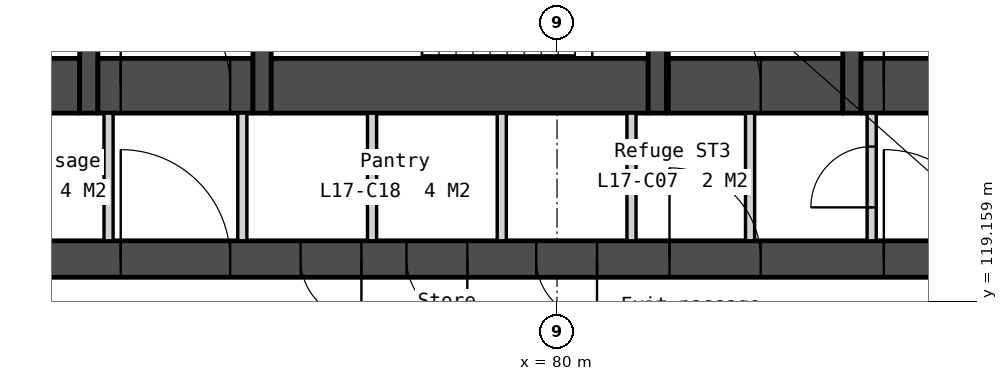
"""IFC4 building model, lengths in metres.
Left out: names, types, materials, properties, quantities, classifications, styles, units other than length and angle.
Written with IfcOpenShell. Run it as: python <this file> out.ifc"""

import sys

from ifc_helpers import new_model, si_unit, direction, frame, frame_2d, origin, place, context, subcontext, project, spatial, polyline, rectangle, outline, extrude, element, fill, save


model = new_model("IFC4")
c1 = context("Model", 3, precision=1e-05, world=origin(), true_north=direction((0.0, 1.0)))
c2 = subcontext(c1, "Body", "Model", "MODEL_VIEW")
j1 = project(units=[si_unit("LENGTHUNIT", "METRE"), si_unit("PLANEANGLEUNIT", "RADIAN")], contexts=[c1])
p1 = place(None, origin())
s1 = spatial("IfcSite", under=j1, at=p1, CompositionType="ELEMENT")
p2 = place(p1, origin())
s2 = spatial("IfcBuilding", under=s1, at=p2, CompositionType="ELEMENT")
p3 = place(p2, frame((0.0, 0.0, 73.5)))
s3 = spatial("IfcBuildingStorey", under=s2, at=p3, CompositionType="ELEMENT", Elevation=73.5)
p4 = place(p3, frame((66.0, 119.85, 0.0), z_axis=(0.0, 0.0, 1.0), x_axis=(1.0, 0.0, 0.0)))
e1 = element("IfcWall", 1, at=p4, inside=s3, PredefinedType="SOLIDWALL", context=c2, shape_type="SweptSolid", body=[
    extrude(rectangle(XDim=28.0, YDim=0.6, at=frame_2d((14.0, 0.0))), origin(), (0.0, 0.0, 1.0), 3.25),
])
p5 = place(p4, frame((6.825, 0.0, 0.0)))
e2 = element("IfcOpeningElement", 2, at=p5, cuts=e1, PredefinedType="OPENING", context=c2, shape_type="SweptSolid", body=[
    extrude(rectangle(XDim=1.8, YDim=2.1, at=frame_2d((0.9, 1.05))), frame((0.0, 0.31, 0.0), z_axis=(0.0, -1.0, 0.0), x_axis=(1.0, 0.0, 0.0)), (0.0, 0.0, 1.0), 0.62),
])
p6 = place(p4, frame((15.85, 0.0, 0.0)))
e3 = element("IfcOpeningElement", 3, at=p6, cuts=e1, PredefinedType="OPENING", context=c2, shape_type="SweptSolid", body=[
    extrude(rectangle(XDim=1.5, YDim=2.1, at=frame_2d((0.75, 1.05))), frame((0.0, 0.31, 0.0), z_axis=(0.0, -1.0, 0.0), x_axis=(1.0, 0.0, 0.0)), (0.0, 0.0, 1.0), 0.62),
])
p7 = place(p4, frame((19.375, 0.0, 0.0)))
e4 = element("IfcOpeningElement", 4, at=p7, cuts=e1, PredefinedType="OPENING", context=c2, shape_type="SweptSolid", body=[
    extrude(rectangle(XDim=1.8, YDim=2.1, at=frame_2d((0.9, 1.05))), frame((0.0, 0.31, 0.0), z_axis=(0.0, -1.0, 0.0), x_axis=(1.0, 0.0, 0.0)), (0.0, 0.0, 1.0), 0.62),
])
p8 = place(p4, frame((4.425, 0.0, 0.0)))
e5 = element("IfcOpeningElement", 5, at=p8, cuts=e1, PredefinedType="OPENING", context=c2, shape_type="SweptSolid", body=[
    extrude(rectangle(XDim=1.0, YDim=2.1, at=frame_2d((0.5, 1.05))), frame((0.0, 0.31, 0.0), z_axis=(0.0, -1.0, 0.0), x_axis=(1.0, 0.0, 0.0)), (0.0, 0.0, 1.0), 0.62),
])
p9 = place(p4, frame((9.783, 0.0, 0.0)))
e6 = element("IfcOpeningElement", 6, at=p9, cuts=e1, PredefinedType="OPENING", context=c2, shape_type="SweptSolid", body=[
    extrude(rectangle(XDim=1.0, YDim=2.1, at=frame_2d((0.5, 1.05))), frame((0.0, 0.31, 0.0), z_axis=(0.0, -1.0, 0.0), x_axis=(1.0, 0.0, 0.0)), (0.0, 0.0, 1.0), 0.62),
])
p10 = place(p4, frame((11.525, 0.0, 0.0)))
e7 = element("IfcOpeningElement", 7, at=p10, cuts=e1, PredefinedType="OPENING", context=c2, shape_type="SweptSolid", body=[
    extrude(rectangle(XDim=1.0, YDim=2.1, at=frame_2d((0.5, 1.05))), frame((0.0, 0.31, 0.0), z_axis=(0.0, -1.0, 0.0), x_axis=(1.0, 0.0, 0.0)), (0.0, 0.0, 1.0), 0.62),
])
p11 = place(p4, frame((13.658, 0.0, 0.0)))
e8 = element("IfcOpeningElement", 8, at=p11, cuts=e1, PredefinedType="OPENING", context=c2, shape_type="SweptSolid", body=[
    extrude(rectangle(XDim=1.0, YDim=2.1, at=frame_2d((0.5, 1.05))), frame((0.0, 0.31, 0.0), z_axis=(0.0, -1.0, 0.0), x_axis=(1.0, 0.0, 0.0)), (0.0, 0.0, 1.0), 0.62),
])
p12 = place(p4, frame((22.575, 0.0, 0.0)))
e9 = element("IfcOpeningElement", 9, at=p12, cuts=e1, PredefinedType="OPENING", context=c2, shape_type="SweptSolid", body=[
    extrude(rectangle(XDim=1.0, YDim=2.1, at=frame_2d((0.5, 1.05))), frame((0.0, 0.31, 0.0), z_axis=(0.0, -1.0, 0.0), x_axis=(1.0, 0.0, 0.0)), (0.0, 0.0, 1.0), 0.62),
])
p13 = place(p3, frame((69.6, 122.7, 0.0), z_axis=(0.0, 0.0, 1.0), x_axis=(1.0, 0.0, 0.0)))
e10 = element("IfcWall", 10, at=p13, inside=s3, PredefinedType="SOLIDWALL", context=c2, shape_type="SweptSolid", body=[
    extrude(rectangle(XDim=2.55, YDim=0.9, at=frame_2d((1.275, 0.0))), origin(), (0.0, 0.0, 1.0), 3.25),
])
p14 = place(p3, frame((72.3, 133.95, 0.0), z_axis=(0.0, 0.0, 1.0), x_axis=(0.0, -1.0, 0.0)))
e11 = element("IfcWall", 11, at=p14, inside=s3, PredefinedType="SOLIDWALL", context=c2, shape_type="SweptSolid", body=[
    extrude(rectangle(XDim=11.7, YDim=0.3, at=frame_2d((5.85, 0.0))), origin(), (0.0, 0.0, 1.0), 3.25),
])
p15 = place(p14, frame((6.95, 0.0, 0.0)))
e12 = element("IfcOpeningElement", 12, at=p15, cuts=e11, PredefinedType="OPENING", context=c2, shape_type="SweptSolid", body=[
    extrude(rectangle(XDim=1.1, YDim=2.1, at=frame_2d((0.55, 1.05))), frame((0.0, 0.16, 0.0), z_axis=(0.0, -1.0, 0.0), x_axis=(1.0, 0.0, 0.0)), (0.0, 0.0, 1.0), 0.32),
])
p16 = place(p14, frame((9.35, 0.0, 0.0)))
e13 = element("IfcOpeningElement", 13, at=p16, cuts=e11, PredefinedType="OPENING", context=c2, shape_type="SweptSolid", body=[
    extrude(rectangle(XDim=0.9, YDim=2.1, at=frame_2d((0.45, 1.05))), frame((0.0, 0.16, 0.0), z_axis=(0.0, -1.0, 0.0), x_axis=(1.0, 0.0, 0.0)), (0.0, 0.0, 1.0), 0.32),
])
p17 = place(p14, frame((5.1, 0.0, 0.0)))
e14 = element("IfcOpeningElement", 14, at=p17, cuts=e11, PredefinedType="OPENING", context=c2, shape_type="SweptSolid", body=[
    extrude(rectangle(XDim=1.0, YDim=2.1, at=frame_2d((0.5, 1.05))), frame((0.0, 0.16, 0.0), z_axis=(0.0, -1.0, 0.0), x_axis=(1.0, 0.0, 0.0)), (0.0, 0.0, 1.0), 0.32),
])
p18 = place(p3, frame((72.45, 122.7, 0.0), z_axis=(0.0, 0.0, 1.0), x_axis=(1.0, 0.0, 0.0)))
e15 = element("IfcWall", 15, at=p18, inside=s3, PredefinedType="SOLIDWALL", context=c2, shape_type="SweptSolid", body=[
    extrude(rectangle(XDim=2.55, YDim=0.9, at=frame_2d((1.275, 0.0))), origin(), (0.0, 0.0, 1.0), 3.25),
])
p19 = place(p18, frame((0.375, 0.0, 0.0)))
e16 = element("IfcOpeningElement", 16, at=p19, cuts=e15, PredefinedType="OPENING", context=c2, shape_type="SweptSolid", body=[
    extrude(rectangle(XDim=1.8, YDim=2.1, at=frame_2d((0.9, 1.05))), frame((0.0, 0.46, 0.0), z_axis=(0.0, -1.0, 0.0), x_axis=(1.0, 0.0, 0.0)), (0.0, 0.0, 1.0), 0.92),
])
for number, where, z_axis, x_axis in (
    (17, (72.625, 122.25, 0.0), (0.0, 0.0, 1.0), (0.0, -1.0, 0.0)),
    (18, (74.825, 122.25, 0.0), (0.0, 0.0, 1.0), (0.0, -1.0, 0.0)),
):
    element("IfcWall", number, at=place(p3, frame(where, z_axis=z_axis, x_axis=x_axis)), inside=s3, PredefinedType="PARTITIONING", context=c2, shape_type="SweptSolid", body=[
        extrude(rectangle(XDim=2.1, YDim=0.15, at=frame_2d((1.05, 0.0))), origin(), (0.0, 0.0, 1.0), 3.25),
    ])
p20 = place(p3, frame((75.15, 133.95, 0.0), z_axis=(0.0, 0.0, 1.0), x_axis=(0.0, -1.0, 0.0)))
e19 = element("IfcWall", 19, at=p20, inside=s3, PredefinedType="SOLIDWALL", context=c2, shape_type="SweptSolid", body=[
    extrude(rectangle(XDim=11.7, YDim=0.3, at=frame_2d((5.85, 0.0))), origin(), (0.0, 0.0, 1.0), 3.25),
])
p21 = place(p3, frame((75.3, 122.7, 0.0), z_axis=(0.0, 0.0, 1.0), x_axis=(1.0, 0.0, 0.0)))
e20 = element("IfcWall", 20, at=p21, inside=s3, PredefinedType="SOLIDWALL", context=c2, shape_type="SweptSolid", body=[
    extrude(rectangle(XDim=6.2, YDim=0.9, at=frame_2d((3.1, 0.0))), origin(), (0.0, 0.0, 1.0), 3.25),
])
for number, where, z_axis, x_axis in (
    (21, (76.958, 122.25, 0.0), (0.0, 0.0, 1.0), (0.0, -1.0, 0.0)),
    (22, (79.092, 122.25, 0.0), (0.0, 0.0, 1.0), (0.0, -1.0, 0.0)),
    (23, (81.225, 122.25, 0.0), (0.0, 0.0, 1.0), (0.0, -1.0, 0.0)),
):
    element("IfcWall", number, at=place(p3, frame(where, z_axis=z_axis, x_axis=x_axis)), inside=s3, PredefinedType="PARTITIONING", context=c2, shape_type="SweptSolid", body=[
        extrude(rectangle(XDim=2.1, YDim=0.15, at=frame_2d((1.05, 0.0))), origin(), (0.0, 0.0, 1.0), 3.25),
    ])
p22 = place(p3, frame((81.65, 125.7, 0.0), z_axis=(0.0, 0.0, 1.0), x_axis=(0.0, -1.0, 0.0)))
e24 = element("IfcWall", 24, at=p22, inside=s3, PredefinedType="SOLIDWALL", context=c2, shape_type="SweptSolid", body=[
    extrude(rectangle(XDim=3.45, YDim=0.3, at=frame_2d((1.725, 0.0))), origin(), (0.0, 0.0, 1.0), 3.25),
])
p23 = place(p22, frame((0.75, 0.0, 0.0)))
e25 = element("IfcOpeningElement", 25, at=p23, cuts=e24, PredefinedType="OPENING", context=c2, shape_type="SweptSolid", body=[
    extrude(rectangle(XDim=1.0, YDim=2.1, at=frame_2d((0.5, 1.05))), frame((0.0, 0.16, 0.0), z_axis=(0.0, -1.0, 0.0), x_axis=(1.0, 0.0, 0.0)), (0.0, 0.0, 1.0), 0.32),
])
p24 = place(p3, frame((81.8, 122.7, 0.0), z_axis=(0.0, 0.0, 1.0), x_axis=(1.0, 0.0, 0.0)))
e26 = element("IfcWall", 26, at=p24, inside=s3, PredefinedType="SOLIDWALL", context=c2, shape_type="SweptSolid", body=[
    extrude(rectangle(XDim=2.9, YDim=0.9, at=frame_2d((1.45, 0.0))), origin(), (0.0, 0.0, 1.0), 3.25),
])
p25 = place(p24, frame((0.05, 0.0, 0.0)))
e27 = element("IfcOpeningElement", 27, at=p25, cuts=e26, PredefinedType="OPENING", context=c2, shape_type="SweptSolid", body=[
    extrude(rectangle(XDim=1.5, YDim=2.1, at=frame_2d((0.75, 1.05))), frame((0.0, 0.46, 0.0), z_axis=(0.0, -1.0, 0.0), x_axis=(1.0, 0.0, 0.0)), (0.0, 0.0, 1.0), 0.92),
])
p26 = place(p3, frame((83.175, 122.25, 0.0), z_axis=(0.0, 0.0, 1.0), x_axis=(0.0, -1.0, 0.0)))
e28 = element("IfcWall", 28, at=p26, inside=s3, PredefinedType="PARTITIONING", context=c2, shape_type="SweptSolid", body=[
    extrude(rectangle(XDim=2.1, YDim=0.15, at=frame_2d((1.05, 0.0))), origin(), (0.0, 0.0, 1.0), 3.25),
])
p27 = place(p3, frame((84.85, 133.95, 0.0), z_axis=(0.0, 0.0, 1.0), x_axis=(0.0, -1.0, 0.0)))
e29 = element("IfcWall", 29, at=p27, inside=s3, PredefinedType="SOLIDWALL", context=c2, shape_type="SweptSolid", body=[
    extrude(rectangle(XDim=11.7, YDim=0.3, at=frame_2d((5.85, 0.0))), origin(), (0.0, 0.0, 1.0), 3.25),
])
p28 = place(p3, frame((85.0, 122.7, 0.0), z_axis=(0.0, 0.0, 1.0), x_axis=(1.0, 0.0, 0.0)))
e30 = element("IfcWall", 30, at=p28, inside=s3, PredefinedType="SOLIDWALL", context=c2, shape_type="SweptSolid", body=[
    extrude(rectangle(XDim=2.55, YDim=0.9, at=frame_2d((1.275, 0.0))), origin(), (0.0, 0.0, 1.0), 3.25),
])
p29 = place(p28, frame((0.375, 0.0, 0.0)))
e31 = element("IfcOpeningElement", 31, at=p29, cuts=e30, PredefinedType="OPENING", context=c2, shape_type="SweptSolid", body=[
    extrude(rectangle(XDim=1.8, YDim=2.1, at=frame_2d((0.9, 1.05))), frame((0.0, 0.46, 0.0), z_axis=(0.0, -1.0, 0.0), x_axis=(1.0, 0.0, 0.0)), (0.0, 0.0, 1.0), 0.92),
])
p30 = place(p3, frame((85.175, 122.25, 0.0), z_axis=(0.0, 0.0, 1.0), x_axis=(0.0, -1.0, 0.0)))
e32 = element("IfcWall", 32, at=p30, inside=s3, PredefinedType="PARTITIONING", context=c2, shape_type="SweptSolid", body=[
    extrude(rectangle(XDim=2.1, YDim=0.15, at=frame_2d((1.05, 0.0))), origin(), (0.0, 0.0, 1.0), 3.25),
])
p31 = place(p30, frame((0.55, 0.0, 0.0)))
e33 = element("IfcOpeningElement", 33, at=p31, cuts=e32, PredefinedType="OPENING", context=c2, shape_type="SweptSolid", body=[
    extrude(rectangle(XDim=1.0, YDim=2.1, at=frame_2d((0.5, 1.05))), frame((0.0, 0.085, 0.0), z_axis=(0.0, -1.0, 0.0), x_axis=(1.0, 0.0, 0.0)), (0.0, 0.0, 1.0), 0.17),
])
p32 = place(p3, frame((54.495, 129.397, -0.15), z_axis=(0.0, 0.0, 1.0), x_axis=(0.499999201451, -0.866025864826, 0.0)))
e34 = element("IfcWall", 34, at=p32, inside=s3, PredefinedType="SOLIDWALL", context=c2, shape_type="SweptSolid", body=[
    extrude(outline(polyline([(44.8, 0.0), (44.8, 3.4), (0.0, 3.4), (0.0, 0.0), (44.8, 0.0)])), frame((0.0, 0.225, 0.0), z_axis=(0.0, -1.0, 0.0), x_axis=(1.0, 0.0, 0.0)), (0.0, 0.0, 1.0), 0.45),
])
p33 = place(p32, frame((3.03, 0.0, 1.05)))
e35 = element("IfcOpeningElement", 35, at=p33, cuts=e34, PredefinedType="OPENING", context=c2, shape_type="SweptSolid", body=[
    extrude(rectangle(XDim=1.2, YDim=1.5, at=frame_2d((0.6, 0.75))), frame((0.0, 0.235, 0.0), z_axis=(0.0, -1.0, 0.0), x_axis=(1.0, 0.0, 0.0)), (0.0, 0.0, 1.0), 0.47),
])
p34 = place(p32, frame((4.73, 0.0, 1.05)))
e36 = element("IfcOpeningElement", 36, at=p34, cuts=e34, PredefinedType="OPENING", context=c2, shape_type="SweptSolid", body=[
    extrude(rectangle(XDim=1.2, YDim=1.5, at=frame_2d((0.6, 0.75))), frame((0.0, 0.235, 0.0), z_axis=(0.0, -1.0, 0.0), x_axis=(1.0, 0.0, 0.0)), (0.0, 0.0, 1.0), 0.47),
])
p35 = place(p32, frame((11.99, 0.0, 1.05)))
e37 = element("IfcOpeningElement", 37, at=p35, cuts=e34, PredefinedType="OPENING", context=c2, shape_type="SweptSolid", body=[
    extrude(rectangle(XDim=1.2, YDim=1.5, at=frame_2d((0.6, 0.75))), frame((0.0, 0.235, 0.0), z_axis=(0.0, -1.0, 0.0), x_axis=(1.0, 0.0, 0.0)), (0.0, 0.0, 1.0), 0.47),
])
p36 = place(p32, frame((13.69, 0.0, 1.05)))
e38 = element("IfcOpeningElement", 38, at=p36, cuts=e34, PredefinedType="OPENING", context=c2, shape_type="SweptSolid", body=[
    extrude(rectangle(XDim=1.2, YDim=1.5, at=frame_2d((0.6, 0.75))), frame((0.0, 0.235, 0.0), z_axis=(0.0, -1.0, 0.0), x_axis=(1.0, 0.0, 0.0)), (0.0, 0.0, 1.0), 0.47),
])
p37 = place(p32, frame((20.95, 0.0, 1.05)))
e39 = element("IfcOpeningElement", 39, at=p37, cuts=e34, PredefinedType="OPENING", context=c2, shape_type="SweptSolid", body=[
    extrude(rectangle(XDim=1.2, YDim=1.5, at=frame_2d((0.6, 0.75))), frame((0.0, 0.235, 0.0), z_axis=(0.0, -1.0, 0.0), x_axis=(1.0, 0.0, 0.0)), (0.0, 0.0, 1.0), 0.47),
])
p38 = place(p32, frame((22.65, 0.0, 1.05)))
e40 = element("IfcOpeningElement", 40, at=p38, cuts=e34, PredefinedType="OPENING", context=c2, shape_type="SweptSolid", body=[
    extrude(rectangle(XDim=1.2, YDim=1.5, at=frame_2d((0.6, 0.75))), frame((0.0, 0.235, 0.0), z_axis=(0.0, -1.0, 0.0), x_axis=(1.0, 0.0, 0.0)), (0.0, 0.0, 1.0), 0.47),
])
p39 = place(p32, frame((29.91, 0.0, 1.05)))
e41 = element("IfcOpeningElement", 41, at=p39, cuts=e34, PredefinedType="OPENING", context=c2, shape_type="SweptSolid", body=[
    extrude(rectangle(XDim=1.2, YDim=1.5, at=frame_2d((0.6, 0.75))), frame((0.0, 0.235, 0.0), z_axis=(0.0, -1.0, 0.0), x_axis=(1.0, 0.0, 0.0)), (0.0, 0.0, 1.0), 0.47),
])
p40 = place(p32, frame((31.61, 0.0, 1.05)))
e42 = element("IfcOpeningElement", 42, at=p40, cuts=e34, PredefinedType="OPENING", context=c2, shape_type="SweptSolid", body=[
    extrude(rectangle(XDim=1.2, YDim=1.5, at=frame_2d((0.6, 0.75))), frame((0.0, 0.235, 0.0), z_axis=(0.0, -1.0, 0.0), x_axis=(1.0, 0.0, 0.0)), (0.0, 0.0, 1.0), 0.47),
])
p41 = place(p32, frame((38.87, 0.0, 1.05)))
e43 = element("IfcOpeningElement", 43, at=p41, cuts=e34, PredefinedType="OPENING", context=c2, shape_type="SweptSolid", body=[
    extrude(rectangle(XDim=1.2, YDim=1.5, at=frame_2d((0.6, 0.75))), frame((0.0, 0.235, 0.0), z_axis=(0.0, -1.0, 0.0), x_axis=(1.0, 0.0, 0.0)), (0.0, 0.0, 1.0), 0.47),
])
p42 = place(p32, frame((40.57, 0.0, 1.05)))
e44 = element("IfcOpeningElement", 44, at=p42, cuts=e34, PredefinedType="OPENING", context=c2, shape_type="SweptSolid", body=[
    extrude(rectangle(XDim=1.2, YDim=1.5, at=frame_2d((0.6, 0.75))), frame((0.0, 0.235, 0.0), z_axis=(0.0, -1.0, 0.0), x_axis=(1.0, 0.0, 0.0)), (0.0, 0.0, 1.0), 0.47),
])
p43 = place(p3, frame((83.105, 90.599, -0.15), z_axis=(0.0, 0.0, 1.0), x_axis=(0.499999201451, 0.866025864826, 0.0)))
e45 = element("IfcWall", 45, at=p43, inside=s3, PredefinedType="SOLIDWALL", context=c2, shape_type="SweptSolid", body=[
    extrude(outline(polyline([(44.8, 0.0), (44.8, 3.4), (0.0, 3.4), (0.0, 0.0), (44.8, 0.0)])), frame((0.0, 0.225, 0.0), z_axis=(0.0, -1.0, 0.0), x_axis=(1.0, 0.0, 0.0)), (0.0, 0.0, 1.0), 0.45),
])
p44 = place(p43, frame((3.03, 0.0, 1.05)))
e46 = element("IfcOpeningElement", 46, at=p44, cuts=e45, PredefinedType="OPENING", context=c2, shape_type="SweptSolid", body=[
    extrude(rectangle(XDim=1.2, YDim=1.5, at=frame_2d((0.6, 0.75))), frame((0.0, 0.235, 0.0), z_axis=(0.0, -1.0, 0.0), x_axis=(1.0, 0.0, 0.0)), (0.0, 0.0, 1.0), 0.47),
])
p45 = place(p43, frame((4.73, 0.0, 1.05)))
e47 = element("IfcOpeningElement", 47, at=p45, cuts=e45, PredefinedType="OPENING", context=c2, shape_type="SweptSolid", body=[
    extrude(rectangle(XDim=1.2, YDim=1.5, at=frame_2d((0.6, 0.75))), frame((0.0, 0.235, 0.0), z_axis=(0.0, -1.0, 0.0), x_axis=(1.0, 0.0, 0.0)), (0.0, 0.0, 1.0), 0.47),
])
p46 = place(p43, frame((11.99, 0.0, 1.05)))
e48 = element("IfcOpeningElement", 48, at=p46, cuts=e45, PredefinedType="OPENING", context=c2, shape_type="SweptSolid", body=[
    extrude(rectangle(XDim=1.2, YDim=1.5, at=frame_2d((0.6, 0.75))), frame((0.0, 0.235, 0.0), z_axis=(0.0, -1.0, 0.0), x_axis=(1.0, 0.0, 0.0)), (0.0, 0.0, 1.0), 0.47),
])
p47 = place(p43, frame((13.69, 0.0, 1.05)))
e49 = element("IfcOpeningElement", 49, at=p47, cuts=e45, PredefinedType="OPENING", context=c2, shape_type="SweptSolid", body=[
    extrude(rectangle(XDim=1.2, YDim=1.5, at=frame_2d((0.6, 0.75))), frame((0.0, 0.235, 0.0), z_axis=(0.0, -1.0, 0.0), x_axis=(1.0, 0.0, 0.0)), (0.0, 0.0, 1.0), 0.47),
])
p48 = place(p43, frame((20.95, 0.0, 1.05)))
e50 = element("IfcOpeningElement", 50, at=p48, cuts=e45, PredefinedType="OPENING", context=c2, shape_type="SweptSolid", body=[
    extrude(rectangle(XDim=1.2, YDim=1.5, at=frame_2d((0.6, 0.75))), frame((0.0, 0.235, 0.0), z_axis=(0.0, -1.0, 0.0), x_axis=(1.0, 0.0, 0.0)), (0.0, 0.0, 1.0), 0.47),
])
p49 = place(p43, frame((22.65, 0.0, 1.05)))
e51 = element("IfcOpeningElement", 51, at=p49, cuts=e45, PredefinedType="OPENING", context=c2, shape_type="SweptSolid", body=[
    extrude(rectangle(XDim=1.2, YDim=1.5, at=frame_2d((0.6, 0.75))), frame((0.0, 0.235, 0.0), z_axis=(0.0, -1.0, 0.0), x_axis=(1.0, 0.0, 0.0)), (0.0, 0.0, 1.0), 0.47),
])
p50 = place(p43, frame((29.91, 0.0, 1.05)))
e52 = element("IfcOpeningElement", 52, at=p50, cuts=e45, PredefinedType="OPENING", context=c2, shape_type="SweptSolid", body=[
    extrude(rectangle(XDim=1.2, YDim=1.5, at=frame_2d((0.6, 0.75))), frame((0.0, 0.235, 0.0), z_axis=(0.0, -1.0, 0.0), x_axis=(1.0, 0.0, 0.0)), (0.0, 0.0, 1.0), 0.47),
])
p51 = place(p43, frame((31.61, 0.0, 1.05)))
e53 = element("IfcOpeningElement", 53, at=p51, cuts=e45, PredefinedType="OPENING", context=c2, shape_type="SweptSolid", body=[
    extrude(rectangle(XDim=1.2, YDim=1.5, at=frame_2d((0.6, 0.75))), frame((0.0, 0.235, 0.0), z_axis=(0.0, -1.0, 0.0), x_axis=(1.0, 0.0, 0.0)), (0.0, 0.0, 1.0), 0.47),
])
p52 = place(p43, frame((38.87, 0.0, 1.05)))
e54 = element("IfcOpeningElement", 54, at=p52, cuts=e45, PredefinedType="OPENING", context=c2, shape_type="SweptSolid", body=[
    extrude(rectangle(XDim=1.2, YDim=1.5, at=frame_2d((0.6, 0.75))), frame((0.0, 0.235, 0.0), z_axis=(0.0, -1.0, 0.0), x_axis=(1.0, 0.0, 0.0)), (0.0, 0.0, 1.0), 0.47),
])
p53 = place(p43, frame((40.57, 0.0, 1.05)))
e55 = element("IfcOpeningElement", 55, at=p53, cuts=e45, PredefinedType="OPENING", context=c2, shape_type="SweptSolid", body=[
    extrude(rectangle(XDim=1.2, YDim=1.5, at=frame_2d((0.6, 0.75))), frame((0.0, 0.235, 0.0), z_axis=(0.0, -1.0, 0.0), x_axis=(1.0, 0.0, 0.0)), (0.0, 0.0, 1.0), 0.47),
])
p54 = place(p29, origin())
e56 = element("IfcDoor", 56, at=p54, inside=s3, OperationType="DOUBLE_DOOR_DOUBLE_SWING", PredefinedType="DOOR", context=c2, shape_type="SweptSolid", body=[
    extrude(rectangle(XDim=1.8, YDim=2.1, at=frame_2d((0.9, 1.05))), frame((0.0, 0.025, 0.0), z_axis=(0.0, -1.0, 0.0), x_axis=(1.0, 0.0, 0.0)), (0.0, 0.0, 1.0), 0.05),
])
fill(e31, e56)
p55 = place(p19, origin())
e57 = element("IfcDoor", 57, at=p55, inside=s3, OperationType="DOUBLE_DOOR_DOUBLE_SWING", PredefinedType="DOOR", context=c2, shape_type="SweptSolid", body=[
    extrude(rectangle(XDim=1.8, YDim=2.1, at=frame_2d((0.9, 1.05))), frame((0.0, 0.025, 0.0), z_axis=(0.0, -1.0, 0.0), x_axis=(1.0, 0.0, 0.0)), (0.0, 0.0, 1.0), 0.05),
])
fill(e16, e57)
p56 = place(p25, origin())
e58 = element("IfcDoor", 58, at=p56, inside=s3, OperationType="DOUBLE_DOOR_DOUBLE_SWING", PredefinedType="DOOR", context=c2, shape_type="SweptSolid", body=[
    extrude(rectangle(XDim=1.5, YDim=2.1, at=frame_2d((0.75, 1.05))), frame((0.0, 0.025, 0.0), z_axis=(0.0, -1.0, 0.0), x_axis=(1.0, 0.0, 0.0)), (0.0, 0.0, 1.0), 0.05),
])
fill(e27, e58)
p57 = place(p5, origin())
e59 = element("IfcDoor", 59, at=p57, inside=s3, OperationType="DOUBLE_DOOR_DOUBLE_SWING", PredefinedType="DOOR", context=c2, shape_type="SweptSolid", body=[
    extrude(rectangle(XDim=1.8, YDim=2.1, at=frame_2d((0.9, 1.05))), frame((0.0, 0.025, 0.0), z_axis=(0.0, -1.0, 0.0), x_axis=(1.0, 0.0, 0.0)), (0.0, 0.0, 1.0), 0.05),
])
fill(e2, e59)
p58 = place(p6, origin())
e60 = element("IfcDoor", 60, at=p58, inside=s3, OperationType="DOUBLE_DOOR_DOUBLE_SWING", PredefinedType="DOOR", context=c2, shape_type="SweptSolid", body=[
    extrude(rectangle(XDim=1.5, YDim=2.1, at=frame_2d((0.75, 1.05))), frame((0.0, 0.025, 0.0), z_axis=(0.0, -1.0, 0.0), x_axis=(1.0, 0.0, 0.0)), (0.0, 0.0, 1.0), 0.05),
])
fill(e3, e60)
p59 = place(p7, origin())
e61 = element("IfcDoor", 61, at=p59, inside=s3, OperationType="DOUBLE_DOOR_DOUBLE_SWING", PredefinedType="DOOR", context=c2, shape_type="SweptSolid", body=[
    extrude(rectangle(XDim=1.8, YDim=2.1, at=frame_2d((0.9, 1.05))), frame((0.0, 0.025, 0.0), z_axis=(0.0, -1.0, 0.0), x_axis=(1.0, 0.0, 0.0)), (0.0, 0.0, 1.0), 0.05),
])
fill(e4, e61)
p60 = place(p9, origin())
e62 = element("IfcDoor", 62, at=p60, inside=s3, OperationType="SINGLE_SWING_RIGHT", PredefinedType="DOOR", context=c2, shape_type="SweptSolid", body=[
    extrude(rectangle(XDim=1.0, YDim=2.1, at=frame_2d((0.5, 1.05))), frame((0.0, 0.025, 0.0), z_axis=(0.0, -1.0, 0.0), x_axis=(1.0, 0.0, 0.0)), (0.0, 0.0, 1.0), 0.05),
])
fill(e6, e62)
p61 = place(p10, origin())
e63 = element("IfcDoor", 63, at=p61, inside=s3, OperationType="SINGLE_SWING_RIGHT", PredefinedType="DOOR", context=c2, shape_type="SweptSolid", body=[
    extrude(rectangle(XDim=1.0, YDim=2.1, at=frame_2d((0.5, 1.05))), frame((0.0, 0.025, 0.0), z_axis=(0.0, -1.0, 0.0), x_axis=(1.0, 0.0, 0.0)), (0.0, 0.0, 1.0), 0.05),
])
fill(e7, e63)
p62 = place(p11, origin())
e64 = element("IfcDoor", 64, at=p62, inside=s3, OperationType="SINGLE_SWING_RIGHT", PredefinedType="DOOR", context=c2, shape_type="SweptSolid", body=[
    extrude(rectangle(XDim=1.0, YDim=2.1, at=frame_2d((0.5, 1.05))), frame((0.0, 0.025, 0.0), z_axis=(0.0, -1.0, 0.0), x_axis=(1.0, 0.0, 0.0)), (0.0, 0.0, 1.0), 0.05),
])
fill(e8, e64)
p63 = place(p31, origin())
e65 = element("IfcDoor", 65, at=p63, inside=s3, OperationType="SINGLE_SWING_RIGHT", PredefinedType="DOOR", context=c2, shape_type="SweptSolid", body=[
    extrude(rectangle(XDim=1.0, YDim=2.1, at=frame_2d((0.5, 1.05))), frame((0.0, 0.025, 0.0), z_axis=(0.0, -1.0, 0.0), x_axis=(1.0, 0.0, 0.0)), (0.0, 0.0, 1.0), 0.05),
])
fill(e33, e65)
save(model, sys.argv[1])
